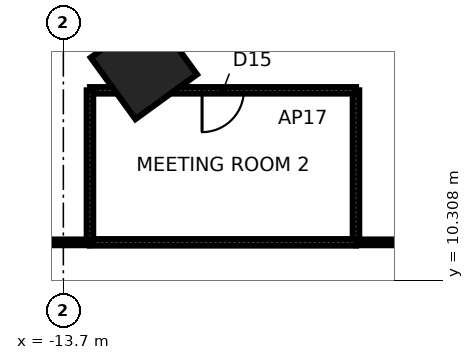
"""IFC4 building model, lengths in metres.
Left out: names, types, materials, properties, quantities, classifications, styles, units other than length and angle.
Written with IfcOpenShell. Run it as: python <this file> out.ifc"""

import sys

from ifc_helpers import new_model, si_unit, direction, frame, frame_2d, origin, origin_2d, place, context, subcontext, project, spatial, rectangle, extrude, element, fill, save


model = new_model("IFC4")
c1 = context("Model", 3, precision=1e-05, world=origin(), true_north=direction((0.0, 1.0)))
c2 = subcontext(c1, "Body", "Model", "MODEL_VIEW")
j1 = project(units=[si_unit("LENGTHUNIT", "METRE"), si_unit("PLANEANGLEUNIT", "RADIAN")], contexts=[c1])
p1 = place(None, origin())
s1 = spatial("IfcSite", under=j1, at=p1, CompositionType="ELEMENT")
p2 = place(p1, origin())
s2 = spatial("IfcBuilding", under=s1, at=p2, CompositionType="ELEMENT")
p3 = place(p2, frame((0.0, 0.0, 32.2)))
s3 = spatial("IfcBuildingStorey", under=s2, at=p3, CompositionType="ELEMENT", Elevation=32.2)
p4 = place(p3, frame((-11.581, 15.94, 0.0), z_axis=(0.0, 0.0, 1.0), x_axis=(-0.587785252292, 0.809016994375, 0.0)))
e1 = element("IfcColumn", 1, at=p4, inside=s3, PredefinedType="COLUMN", context=c2, shape_type="SweptSolid", body=[
    extrude(rectangle(XDim=2.0, YDim=2.0, at=origin_2d()), origin(), (0.0, 0.0, 1.0), 4.2),
])
p5 = place(p3, frame((2.0, 11.3, 0.0), z_axis=(0.0, 0.0, 1.0), x_axis=(-1.0, 0.0, 0.0)))
e2 = element("IfcWall", 2, at=p5, inside=s3, PredefinedType="PARTITIONING", context=c2, shape_type="SweptSolid", body=[
    extrude(rectangle(XDim=8.0, YDim=0.15, at=frame_2d((4.0, 0.0))), origin(), (0.0, 0.0, 1.0), 4.04),
])
p6 = place(p3, frame((-6.0, 11.3, 0.0), z_axis=(0.0, 0.0, 1.0), x_axis=(0.0, 1.0, 0.0)))
e3 = element("IfcWall", 3, at=p6, inside=s3, PredefinedType="PARTITIONING", context=c2, shape_type="SweptSolid", body=[
    extrude(rectangle(XDim=4.0, YDim=0.17, at=frame_2d((2.0, 0.0))), origin(), (0.0, 0.0, 1.0), 4.04),
])
p7 = place(p3, frame((-6.0, 15.3, 0.0), z_axis=(0.0, 0.0, 1.0), x_axis=(-1.0, 0.0, 0.0)))
e4 = element("IfcWall", 4, at=p7, inside=s3, PredefinedType="PARTITIONING", context=c2, shape_type="SweptSolid", body=[
    extrude(rectangle(XDim=7.0, YDim=0.17, at=frame_2d((3.5, 0.0))), origin(), (0.0, 0.0, 1.0), 4.04),
])
p8 = place(p7, frame((2.95, 0.0, 0.0)))
e5 = element("IfcOpeningElement", 5, at=p8, cuts=e4, PredefinedType="OPENING", context=c2, shape_type="SweptSolid", body=[
    extrude(rectangle(XDim=1.1, YDim=2.4, at=frame_2d((0.55, 1.2))), frame((0.0, 0.095, 0.0), z_axis=(0.0, -1.0, 0.0), x_axis=(1.0, 0.0, 0.0)), (0.0, 0.0, 1.0), 0.19),
])
p9 = place(p3, frame((-13.0, 11.3, 0.0), z_axis=(0.0, 0.0, 1.0), x_axis=(1.0, 0.0, 0.0)))
e6 = element("IfcWall", 6, at=p9, inside=s3, PredefinedType="PARTITIONING", context=c2, shape_type="SweptSolid", body=[
    extrude(rectangle(XDim=7.0, YDim=0.17, at=frame_2d((3.5, 0.0))), origin(), (0.0, 0.0, 1.0), 4.04),
])
p10 = place(p3, frame((-13.0, 15.3, 0.0), z_axis=(0.0, 0.0, 1.0), x_axis=(0.0, -1.0, 0.0)))
e7 = element("IfcWall", 7, at=p10, inside=s3, PredefinedType="PARTITIONING", context=c2, shape_type="SweptSolid", body=[
    extrude(rectangle(XDim=4.0, YDim=0.17, at=frame_2d((2.0, 0.0))), origin(), (0.0, 0.0, 1.0), 4.04),
])
p11 = place(p3, frame((-13.0, 11.3, 0.0), z_axis=(0.0, 0.0, 1.0), x_axis=(-1.0, 0.0, 0.0)))
e8 = element("IfcWall", 8, at=p11, inside=s3, PredefinedType="PARTITIONING", context=c2, shape_type="SweptSolid", body=[
    extrude(rectangle(XDim=3.0, YDim=0.15, at=frame_2d((1.5, 0.0))), origin(), (0.0, 0.0, 1.0), 4.04),
])
p12 = place(p8, origin())
e9 = element("IfcDoor", 9, at=p12, inside=s3, OperationType="SINGLE_SWING_RIGHT", PredefinedType="DOOR", context=c2, shape_type="SweptSolid", body=[
    extrude(rectangle(XDim=1.1, YDim=2.4, at=frame_2d((0.55, 1.2))), frame((0.0, 0.025, 0.0), z_axis=(0.0, -1.0, 0.0), x_axis=(1.0, 0.0, 0.0)), (0.0, 0.0, 1.0), 0.05),
])
fill(e5, e9)
save(model, sys.argv[1])
